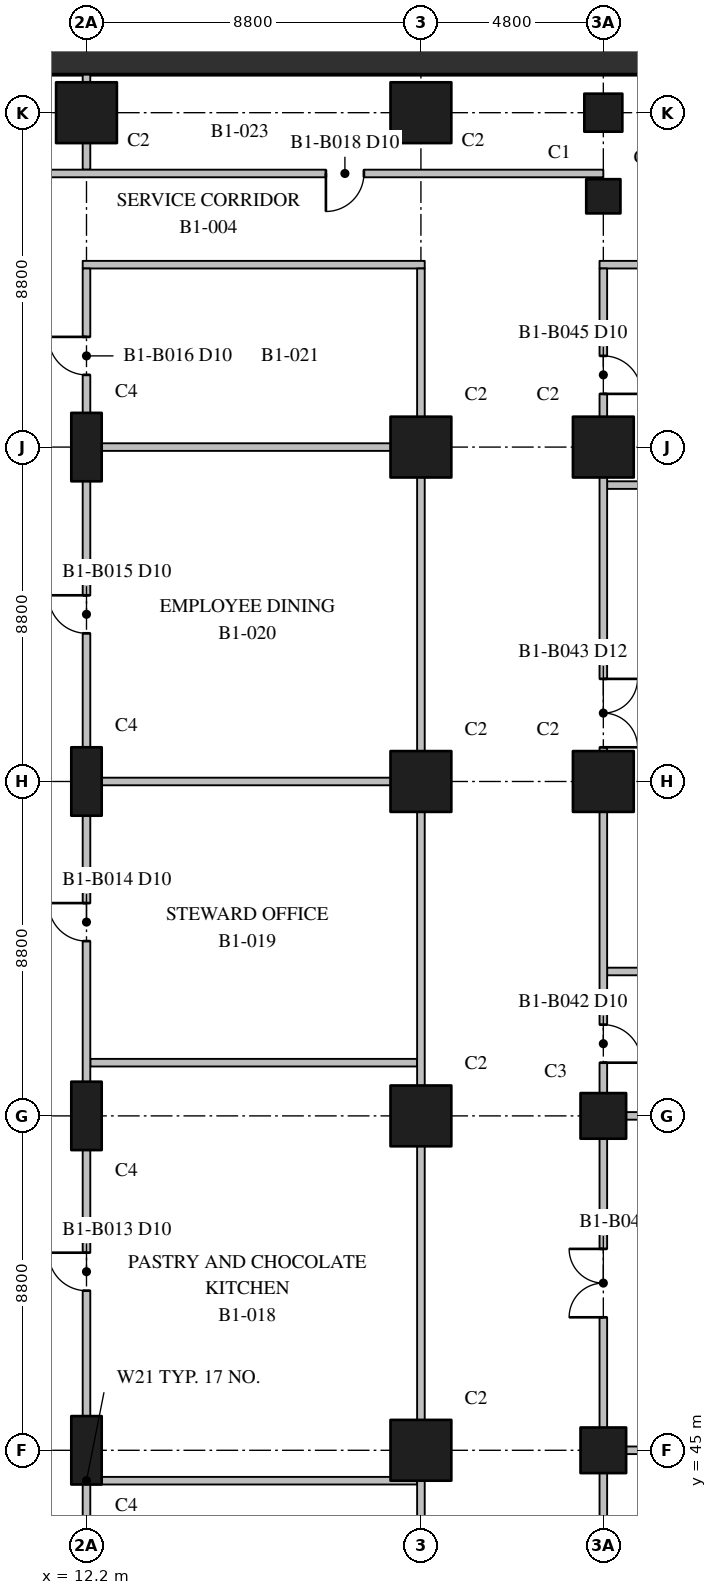
"""IFC4 building model, lengths in metres.
Left out: names, types, materials, properties, quantities, classifications, styles, units other than length and angle.
Written with IfcOpenShell. Run it as: python <this file> out.ifc"""

import sys

from ifc_helpers import new_model, si_unit, direction, frame, frame_2d, origin, origin_2d, place, context, subcontext, project, spatial, rectangle, extrude, element, fill, save


model = new_model("IFC4")
c1 = context("Model", 3, precision=1e-05, world=origin(), true_north=direction((0.0, 1.0)))
c2 = subcontext(c1, "Body", "Model", "MODEL_VIEW")
j1 = project(units=[si_unit("LENGTHUNIT", "METRE"), si_unit("PLANEANGLEUNIT", "RADIAN")], contexts=[c1])
p1 = place(None, origin())
s1 = spatial("IfcSite", under=j1, at=p1, CompositionType="ELEMENT")
p2 = place(p1, origin())
s2 = spatial("IfcBuilding", under=s1, at=p2, CompositionType="ELEMENT")
p3 = place(p2, frame((0.0, 0.0, -7.0)))
s3 = spatial("IfcBuildingStorey", under=s2, at=p3, CompositionType="ELEMENT", Elevation=-7.0)
for number, where, z_axis, x_axis in (
    (1, (12.2, 45.0, 0.0), (0.0, 0.0, 1.0), (0.0, 1.0, 0.0)),
    (2, (12.2, 53.8, 0.0), (0.0, 0.0, 1.0), (0.0, 1.0, 0.0)),
    (3, (12.2, 62.6, 0.0), (0.0, 0.0, 1.0), (0.0, 1.0, 0.0)),
    (4, (12.2, 71.4, 0.0), (0.0, 0.0, 1.0), (0.0, 1.0, 0.0)),
):
    element("IfcColumn", number, at=place(p3, frame(where, z_axis=z_axis, x_axis=x_axis)), inside=s3, PredefinedType="COLUMN", context=c2, shape_type="SweptSolid", body=[
        extrude(rectangle(XDim=1.8, YDim=0.8, at=origin_2d()), origin(), (0.0, 0.0, 1.0), 7.0),
    ])
for number, where, z_axis, x_axis in (
    (5, (12.2, 80.2, 0.0), (0.0, 0.0, 1.0), (1.0, 0.0, 0.0)),
    (6, (21.0, 45.0, 0.0), (0.0, 0.0, 1.0), (1.0, 0.0, 0.0)),
    (7, (21.0, 53.8, 0.0), (0.0, 0.0, 1.0), (1.0, 0.0, 0.0)),
    (8, (21.0, 62.6, 0.0), (0.0, 0.0, 1.0), (1.0, 0.0, 0.0)),
    (9, (21.0, 71.4, 0.0), (0.0, 0.0, 1.0), (1.0, 0.0, 0.0)),
    (10, (21.0, 80.2, 0.0), (0.0, 0.0, 1.0), (1.0, 0.0, 0.0)),
):
    element("IfcColumn", number, at=place(p3, frame(where, z_axis=z_axis, x_axis=x_axis)), inside=s3, PredefinedType="COLUMN", context=c2, shape_type="SweptSolid", body=[
        extrude(rectangle(XDim=1.6, YDim=1.6, at=origin_2d()), origin(), (0.0, 0.0, 1.0), 7.0),
    ])
for number, where, z_axis, x_axis in (
    (11, (25.8, 45.0, 0.0), (0.0, 0.0, 1.0), (1.0, 0.0, 0.0)),
    (12, (25.8, 53.8, 0.0), (0.0, 0.0, 1.0), (1.0, 0.0, 0.0)),
):
    element("IfcColumn", number, at=place(p3, frame(where, z_axis=z_axis, x_axis=x_axis)), inside=s3, PredefinedType="COLUMN", context=c2, shape_type="SweptSolid", body=[
        extrude(rectangle(XDim=1.2, YDim=1.2, at=origin_2d()), origin(), (0.0, 0.0, 1.0), 7.0),
    ])
for number, where, z_axis, x_axis in (
    (13, (25.8, 62.6, 0.0), (0.0, 0.0, 1.0), (1.0, 0.0, 0.0)),
    (14, (25.8, 71.4, 0.0), (0.0, 0.0, 1.0), (1.0, 0.0, 0.0)),
):
    element("IfcColumn", number, at=place(p3, frame(where, z_axis=z_axis, x_axis=x_axis)), inside=s3, PredefinedType="COLUMN", context=c2, shape_type="SweptSolid", body=[
        extrude(rectangle(XDim=1.6, YDim=1.6, at=origin_2d()), origin(), (0.0, 0.0, 1.0), 7.0),
    ])
p4 = place(p3, frame((25.8, 80.2, 0.0), z_axis=(0.0, 0.0, 1.0), x_axis=(1.0, 0.0, 0.0)))
e15 = element("IfcColumn", 15, at=p4, inside=s3, PredefinedType="COLUMN", context=c2, shape_type="SweptSolid", body=[
    extrude(rectangle(XDim=1.0, YDim=1.0, at=origin_2d()), origin(), (0.0, 0.0, 1.0), 7.0),
])
p5 = place(p3, frame((25.8, 78.0, 0.0), z_axis=(0.0, 0.0, 1.0), x_axis=(1.0, 0.0, 0.0)))
e16 = element("IfcColumn", 16, at=p5, inside=s3, PredefinedType="COLUMN", context=c2, shape_type="SweptSolid", body=[
    extrude(rectangle(XDim=0.9, YDim=0.9, at=origin_2d()), origin(), (0.0, 0.0, 1.0), 7.0),
])
p6 = place(p3, frame((1.4, 81.6, 0.0), z_axis=(0.0, 0.0, 1.0), x_axis=(1.0, 0.0, 0.0)))
e17 = element("IfcWall", 17, at=p6, inside=s3, PredefinedType="SHEAR", context=c2, shape_type="SweptSolid", body=[
    extrude(rectangle(XDim=78.0, YDim=0.8, at=frame_2d((39.0, 0.0))), origin(), (0.0, 0.0, 1.0), 7.0),
])
p7 = place(p3, frame((12.1, 76.2, 0.0), z_axis=(0.0, 0.0, 1.0), x_axis=(1.0, 0.0, 0.0)))
e18 = element("IfcWall", 18, at=p7, inside=s3, PredefinedType="PARTITIONING", context=c2, shape_type="SweptSolid", body=[
    extrude(rectangle(XDim=9.0, YDim=0.2, at=frame_2d((4.5, 0.0))), origin(), (0.0, 0.0, 1.0), 6.5),
])
p8 = place(p3, frame((25.7, 76.2, 0.0), z_axis=(0.0, 0.0, 1.0), x_axis=(1.0, 0.0, 0.0)))
e19 = element("IfcWall", 19, at=p8, inside=s3, PredefinedType="PARTITIONING", context=c2, shape_type="SweptSolid", body=[
    extrude(rectangle(XDim=15.4, YDim=0.2, at=frame_2d((7.7, 0.0))), origin(), (0.0, 0.0, 1.0), 6.5),
])
p9 = place(p8, frame((12.7, 0.0, 0.0)))
e20 = element("IfcOpeningElement", 20, at=p9, cuts=e19, PredefinedType="OPENING", context=c2, shape_type="SweptSolid", body=[
    extrude(rectangle(XDim=1.0, YDim=2.1, at=frame_2d((0.5, 1.05))), frame((0.0, 0.11, 0.0), z_axis=(0.0, -1.0, 0.0), x_axis=(1.0, 0.0, 0.0)), (0.0, 0.0, 1.0), 0.22),
])
p10 = place(p3, frame((2.2, 78.6, 0.0), z_axis=(0.0, 0.0, 1.0), x_axis=(1.0, 0.0, 0.0)))
e21 = element("IfcWall", 21, at=p10, inside=s3, PredefinedType="PARTITIONING", context=c2, shape_type="SweptSolid", body=[
    extrude(rectangle(XDim=23.6, YDim=0.2, at=frame_2d((11.8, 0.0))), origin(), (0.0, 0.0, 1.0), 6.5),
])
p11 = place(p10, frame((4.5, 0.0, 0.0)))
e22 = element("IfcOpeningElement", 22, at=p11, cuts=e21, PredefinedType="OPENING", context=c2, shape_type="SweptSolid", body=[
    extrude(rectangle(XDim=1.0, YDim=2.1, at=frame_2d((0.5, 1.05))), frame((0.0, 0.11, 0.0), z_axis=(0.0, -1.0, 0.0), x_axis=(1.0, 0.0, 0.0)), (0.0, 0.0, 1.0), 0.22),
])
p12 = place(p10, frame((16.3, 0.0, 0.0)))
e23 = element("IfcOpeningElement", 23, at=p12, cuts=e21, PredefinedType="OPENING", context=c2, shape_type="SweptSolid", body=[
    extrude(rectangle(XDim=1.0, YDim=2.1, at=frame_2d((0.5, 1.05))), frame((0.0, 0.11, 0.0), z_axis=(0.0, -1.0, 0.0), x_axis=(1.0, 0.0, 0.0)), (0.0, 0.0, 1.0), 0.22),
])
for number, where, z_axis, x_axis in (
    (24, (12.3, 44.2, 0.0), (0.0, 0.0, 1.0), (1.0, 0.0, 0.0)),
    (25, (12.3, 55.2, 0.0), (0.0, 0.0, 1.0), (1.0, 0.0, 0.0)),
    (26, (12.3, 62.6, 0.0), (0.0, 0.0, 1.0), (1.0, 0.0, 0.0)),
    (27, (12.3, 71.4, 0.0), (0.0, 0.0, 1.0), (1.0, 0.0, 0.0)),
):
    element("IfcWall", number, at=place(p3, frame(where, z_axis=z_axis, x_axis=x_axis)), inside=s3, PredefinedType="PARTITIONING", context=c2, shape_type="SweptSolid", body=[
        extrude(rectangle(XDim=8.6, YDim=0.2, at=frame_2d((4.3, 0.0))), origin(), (0.0, 0.0, 1.0), 6.5),
    ])
p13 = place(p3, frame((25.9, 45.0, 0.0), z_axis=(0.0, 0.0, 1.0), x_axis=(1.0, 0.0, 0.0)))
e28 = element("IfcWall", 28, at=p13, inside=s3, PredefinedType="PARTITIONING", context=c2, shape_type="SweptSolid", body=[
    extrude(rectangle(XDim=55.3, YDim=0.2, at=frame_2d((27.65, 0.0))), origin(), (0.0, 0.0, 1.0), 6.5),
])
p14 = place(p13, frame((23.4, 0.0, 0.0)))
e29 = element("IfcOpeningElement", 29, at=p14, cuts=e28, PredefinedType="OPENING", context=c2, shape_type="SweptSolid", body=[
    extrude(rectangle(XDim=1.8, YDim=2.4, at=frame_2d((0.9, 1.2))), frame((0.0, 0.11, 0.0), z_axis=(0.0, -1.0, 0.0), x_axis=(1.0, 0.0, 0.0)), (0.0, 0.0, 1.0), 0.22),
])
p15 = place(p13, frame((31.4, 0.0, 0.0)))
e30 = element("IfcOpeningElement", 30, at=p15, cuts=e28, PredefinedType="OPENING", context=c2, shape_type="SweptSolid", body=[
    extrude(rectangle(XDim=1.8, YDim=2.4, at=frame_2d((0.9, 1.2))), frame((0.0, 0.11, 0.0), z_axis=(0.0, -1.0, 0.0), x_axis=(1.0, 0.0, 0.0)), (0.0, 0.0, 1.0), 0.22),
])
p16 = place(p13, frame((40.2, 0.0, 0.0)))
e31 = element("IfcOpeningElement", 31, at=p16, cuts=e28, PredefinedType="OPENING", context=c2, shape_type="SweptSolid", body=[
    extrude(rectangle(XDim=1.8, YDim=2.4, at=frame_2d((0.9, 1.2))), frame((0.0, 0.11, 0.0), z_axis=(0.0, -1.0, 0.0), x_axis=(1.0, 0.0, 0.0)), (0.0, 0.0, 1.0), 0.22),
])
p17 = place(p13, frame((46.9, 0.0, 0.0)))
e32 = element("IfcOpeningElement", 32, at=p17, cuts=e28, PredefinedType="OPENING", context=c2, shape_type="SweptSolid", body=[
    extrude(rectangle(XDim=1.8, YDim=2.4, at=frame_2d((0.9, 1.2))), frame((0.0, 0.11, 0.0), z_axis=(0.0, -1.0, 0.0), x_axis=(1.0, 0.0, 0.0)), (0.0, 0.0, 1.0), 0.22),
])
p18 = place(p3, frame((25.9, 53.8, 0.0), z_axis=(0.0, 0.0, 1.0), x_axis=(1.0, 0.0, 0.0)))
e33 = element("IfcWall", 33, at=p18, inside=s3, PredefinedType="PARTITIONING", context=c2, shape_type="SweptSolid", body=[
    extrude(rectangle(XDim=20.6, YDim=0.2, at=frame_2d((10.3, 0.0))), origin(), (0.0, 0.0, 1.0), 6.5),
])
p19 = place(p3, frame((25.9, 57.6, 0.0), z_axis=(0.0, 0.0, 1.0), x_axis=(1.0, 0.0, 0.0)))
e34 = element("IfcWall", 34, at=p19, inside=s3, PredefinedType="PARTITIONING", context=c2, shape_type="SweptSolid", body=[
    extrude(rectangle(XDim=11.0, YDim=0.2, at=frame_2d((5.5, 0.0))), origin(), (0.0, 0.0, 1.0), 6.5),
])
p20 = place(p19, frame((4.5, 0.0, 0.0)))
e35 = element("IfcOpeningElement", 35, at=p20, cuts=e34, PredefinedType="OPENING", context=c2, shape_type="SweptSolid", body=[
    extrude(rectangle(XDim=1.8, YDim=2.1, at=frame_2d((0.9, 1.05))), frame((0.0, 0.11, 0.0), z_axis=(0.0, -1.0, 0.0), x_axis=(1.0, 0.0, 0.0)), (0.0, 0.0, 1.0), 0.22),
])
p21 = place(p3, frame((25.9, 70.4, 0.0), z_axis=(0.0, 0.0, 1.0), x_axis=(1.0, 0.0, 0.0)))
e36 = element("IfcWall", 36, at=p21, inside=s3, PredefinedType="PARTITIONING", context=c2, shape_type="SweptSolid", body=[
    extrude(rectangle(XDim=10.8, YDim=0.2, at=frame_2d((5.4, 0.0))), origin(), (0.0, 0.0, 1.0), 6.5),
])
p22 = place(p21, frame((4.5, 0.0, 0.0)))
e37 = element("IfcOpeningElement", 37, at=p22, cuts=e36, PredefinedType="OPENING", context=c2, shape_type="SweptSolid", body=[
    extrude(rectangle(XDim=1.8, YDim=2.1, at=frame_2d((0.9, 1.05))), frame((0.0, 0.11, 0.0), z_axis=(0.0, -1.0, 0.0), x_axis=(1.0, 0.0, 0.0)), (0.0, 0.0, 1.0), 0.22),
])
p23 = place(p3, frame((12.2, 12.3, 0.0), z_axis=(0.0, 0.0, 1.0), x_axis=(0.0, 1.0, 0.0)))
e38 = element("IfcWall", 38, at=p23, inside=s3, PredefinedType="PARTITIONING", context=c2, shape_type="SweptSolid", body=[
    extrude(rectangle(XDim=63.8, YDim=0.2, at=frame_2d((31.9, 0.0))), origin(), (0.0, 0.0, 1.0), 6.5),
])
p24 = place(p23, frame((4.3, 0.0, 0.0)))
e39 = element("IfcOpeningElement", 39, at=p24, cuts=e38, PredefinedType="OPENING", context=c2, shape_type="SweptSolid", body=[
    extrude(rectangle(XDim=1.0, YDim=2.1, at=frame_2d((0.5, 1.05))), frame((0.0, 0.11, 0.0), z_axis=(0.0, -1.0, 0.0), x_axis=(1.0, 0.0, 0.0)), (0.0, 0.0, 1.0), 0.22),
])
p25 = place(p23, frame((11.8, 0.0, 0.0)))
e40 = element("IfcOpeningElement", 40, at=p25, cuts=e38, PredefinedType="OPENING", context=c2, shape_type="SweptSolid", body=[
    extrude(rectangle(XDim=1.0, YDim=2.1, at=frame_2d((0.5, 1.05))), frame((0.0, 0.11, 0.0), z_axis=(0.0, -1.0, 0.0), x_axis=(1.0, 0.0, 0.0)), (0.0, 0.0, 1.0), 0.22),
])
p26 = place(p23, frame((19.5, 0.0, 0.0)))
e41 = element("IfcOpeningElement", 41, at=p26, cuts=e38, PredefinedType="OPENING", context=c2, shape_type="SweptSolid", body=[
    extrude(rectangle(XDim=1.0, YDim=2.1, at=frame_2d((0.5, 1.05))), frame((0.0, 0.11, 0.0), z_axis=(0.0, -1.0, 0.0), x_axis=(1.0, 0.0, 0.0)), (0.0, 0.0, 1.0), 0.22),
])
p27 = place(p23, frame((28.0, 0.0, 0.0)))
e42 = element("IfcOpeningElement", 42, at=p27, cuts=e38, PredefinedType="OPENING", context=c2, shape_type="SweptSolid", body=[
    extrude(rectangle(XDim=1.0, YDim=2.1, at=frame_2d((0.5, 1.05))), frame((0.0, 0.11, 0.0), z_axis=(0.0, -1.0, 0.0), x_axis=(1.0, 0.0, 0.0)), (0.0, 0.0, 1.0), 0.22),
])
p28 = place(p23, frame((36.9, 0.0, 0.0)))
e43 = element("IfcOpeningElement", 43, at=p28, cuts=e38, PredefinedType="OPENING", context=c2, shape_type="SweptSolid", body=[
    extrude(rectangle(XDim=1.0, YDim=2.1, at=frame_2d((0.5, 1.05))), frame((0.0, 0.11, 0.0), z_axis=(0.0, -1.0, 0.0), x_axis=(1.0, 0.0, 0.0)), (0.0, 0.0, 1.0), 0.22),
])
p29 = place(p23, frame((46.1, 0.0, 0.0)))
e44 = element("IfcOpeningElement", 44, at=p29, cuts=e38, PredefinedType="OPENING", context=c2, shape_type="SweptSolid", body=[
    extrude(rectangle(XDim=1.0, YDim=2.1, at=frame_2d((0.5, 1.05))), frame((0.0, 0.11, 0.0), z_axis=(0.0, -1.0, 0.0), x_axis=(1.0, 0.0, 0.0)), (0.0, 0.0, 1.0), 0.22),
])
p30 = place(p23, frame((54.2, 0.0, 0.0)))
e45 = element("IfcOpeningElement", 45, at=p30, cuts=e38, PredefinedType="OPENING", context=c2, shape_type="SweptSolid", body=[
    extrude(rectangle(XDim=1.0, YDim=2.1, at=frame_2d((0.5, 1.05))), frame((0.0, 0.11, 0.0), z_axis=(0.0, -1.0, 0.0), x_axis=(1.0, 0.0, 0.0)), (0.0, 0.0, 1.0), 0.22),
])
p31 = place(p23, frame((61.0, 0.0, 0.0)))
e46 = element("IfcOpeningElement", 46, at=p31, cuts=e38, PredefinedType="OPENING", context=c2, shape_type="SweptSolid", body=[
    extrude(rectangle(XDim=1.0, YDim=2.1, at=frame_2d((0.5, 1.05))), frame((0.0, 0.11, 0.0), z_axis=(0.0, -1.0, 0.0), x_axis=(1.0, 0.0, 0.0)), (0.0, 0.0, 1.0), 0.22),
])
p32 = place(p3, frame((12.2, 78.7, 0.0), z_axis=(0.0, 0.0, 1.0), x_axis=(0.0, 1.0, 0.0)))
e47 = element("IfcWall", 47, at=p32, inside=s3, PredefinedType="PARTITIONING", context=c2, shape_type="SweptSolid", body=[
    extrude(rectangle(XDim=2.5, YDim=0.2, at=frame_2d((1.25, 0.0))), origin(), (0.0, 0.0, 1.0), 6.5),
])
p33 = place(p3, frame((21.0, 12.3, 0.0), z_axis=(0.0, 0.0, 1.0), x_axis=(0.0, 1.0, 0.0)))
e48 = element("IfcWall", 48, at=p33, inside=s3, PredefinedType="PARTITIONING", context=c2, shape_type="SweptSolid", body=[
    extrude(rectangle(XDim=63.8, YDim=0.2, at=frame_2d((31.9, 0.0))), origin(), (0.0, 0.0, 1.0), 6.5),
])
p34 = place(p3, frame((25.8, 12.3, 0.0), z_axis=(0.0, 0.0, 1.0), x_axis=(0.0, 1.0, 0.0)))
e49 = element("IfcWall", 49, at=p34, inside=s3, PredefinedType="PARTITIONING", context=c2, shape_type="SweptSolid", body=[
    extrude(rectangle(XDim=63.8, YDim=0.2, at=frame_2d((31.9, 0.0))), origin(), (0.0, 0.0, 1.0), 6.5),
])
p35 = place(p34, frame((18.3, 0.0, 0.0)))
e50 = element("IfcOpeningElement", 50, at=p35, cuts=e49, PredefinedType="OPENING", context=c2, shape_type="SweptSolid", body=[
    extrude(rectangle(XDim=1.8, YDim=2.1, at=frame_2d((0.9, 1.05))), frame((0.0, 0.11, 0.0), z_axis=(0.0, -1.0, 0.0), x_axis=(1.0, 0.0, 0.0)), (0.0, 0.0, 1.0), 0.22),
])
p36 = place(p34, frame((27.4, 0.0, 0.0)))
e51 = element("IfcOpeningElement", 51, at=p36, cuts=e49, PredefinedType="OPENING", context=c2, shape_type="SweptSolid", body=[
    extrude(rectangle(XDim=1.8, YDim=2.1, at=frame_2d((0.9, 1.05))), frame((0.0, 0.11, 0.0), z_axis=(0.0, -1.0, 0.0), x_axis=(1.0, 0.0, 0.0)), (0.0, 0.0, 1.0), 0.22),
])
p37 = place(p34, frame((36.2, 0.0, 0.0)))
e52 = element("IfcOpeningElement", 52, at=p37, cuts=e49, PredefinedType="OPENING", context=c2, shape_type="SweptSolid", body=[
    extrude(rectangle(XDim=1.8, YDim=2.1, at=frame_2d((0.9, 1.05))), frame((0.0, 0.11, 0.0), z_axis=(0.0, -1.0, 0.0), x_axis=(1.0, 0.0, 0.0)), (0.0, 0.0, 1.0), 0.22),
])
p38 = place(p34, frame((42.9, 0.0, 0.0)))
e53 = element("IfcOpeningElement", 53, at=p38, cuts=e49, PredefinedType="OPENING", context=c2, shape_type="SweptSolid", body=[
    extrude(rectangle(XDim=1.0, YDim=2.1, at=frame_2d((0.5, 1.05))), frame((0.0, 0.11, 0.0), z_axis=(0.0, -1.0, 0.0), x_axis=(1.0, 0.0, 0.0)), (0.0, 0.0, 1.0), 0.22),
])
p39 = place(p34, frame((51.2, 0.0, 0.0)))
e54 = element("IfcOpeningElement", 54, at=p39, cuts=e49, PredefinedType="OPENING", context=c2, shape_type="SweptSolid", body=[
    extrude(rectangle(XDim=1.8, YDim=2.1, at=frame_2d((0.9, 1.05))), frame((0.0, 0.11, 0.0), z_axis=(0.0, -1.0, 0.0), x_axis=(1.0, 0.0, 0.0)), (0.0, 0.0, 1.0), 0.22),
])
p40 = place(p34, frame((60.5, 0.0, 0.0)))
e55 = element("IfcOpeningElement", 55, at=p40, cuts=e49, PredefinedType="OPENING", context=c2, shape_type="SweptSolid", body=[
    extrude(rectangle(XDim=1.0, YDim=2.1, at=frame_2d((0.5, 1.05))), frame((0.0, 0.11, 0.0), z_axis=(0.0, -1.0, 0.0), x_axis=(1.0, 0.0, 0.0)), (0.0, 0.0, 1.0), 0.22),
])
p41 = place(p28, origin())
e56 = element("IfcDoor", 56, at=p41, inside=s3, OperationType="SINGLE_SWING_RIGHT", PredefinedType="DOOR", context=c2, shape_type="SweptSolid", body=[
    extrude(rectangle(XDim=1.0, YDim=2.1, at=frame_2d((0.5, 1.05))), frame((0.0, 0.025, 0.0), z_axis=(0.0, -1.0, 0.0), x_axis=(1.0, 0.0, 0.0)), (0.0, 0.0, 1.0), 0.05),
])
fill(e43, e56)
p42 = place(p29, origin())
e57 = element("IfcDoor", 57, at=p42, inside=s3, OperationType="SINGLE_SWING_RIGHT", PredefinedType="DOOR", context=c2, shape_type="SweptSolid", body=[
    extrude(rectangle(XDim=1.0, YDim=2.1, at=frame_2d((0.5, 1.05))), frame((0.0, 0.025, 0.0), z_axis=(0.0, -1.0, 0.0), x_axis=(1.0, 0.0, 0.0)), (0.0, 0.0, 1.0), 0.05),
])
fill(e44, e57)
p43 = place(p30, origin())
e58 = element("IfcDoor", 58, at=p43, inside=s3, OperationType="SINGLE_SWING_RIGHT", PredefinedType="DOOR", context=c2, shape_type="SweptSolid", body=[
    extrude(rectangle(XDim=1.0, YDim=2.1, at=frame_2d((0.5, 1.05))), frame((0.0, 0.025, 0.0), z_axis=(0.0, -1.0, 0.0), x_axis=(1.0, 0.0, 0.0)), (0.0, 0.0, 1.0), 0.05),
])
fill(e45, e58)
p44 = place(p31, origin())
e59 = element("IfcDoor", 59, at=p44, inside=s3, OperationType="SINGLE_SWING_RIGHT", PredefinedType="DOOR", context=c2, shape_type="SweptSolid", body=[
    extrude(rectangle(XDim=1.0, YDim=2.1, at=frame_2d((0.5, 1.05))), frame((0.0, 0.025, 0.0), z_axis=(0.0, -1.0, 0.0), x_axis=(1.0, 0.0, 0.0)), (0.0, 0.0, 1.0), 0.05),
])
fill(e46, e59)
p45 = place(p12, frame((1.0, 0.0, 0.0), z_axis=(0.0, 0.0, 1.0), x_axis=(-1.0, 0.0, 0.0)))
e60 = element("IfcDoor", 60, at=p45, inside=s3, OperationType="SINGLE_SWING_LEFT", PredefinedType="DOOR", context=c2, shape_type="SweptSolid", body=[
    extrude(rectangle(XDim=1.0, YDim=2.1, at=frame_2d((0.5, 1.05))), frame((0.0, 0.025, 0.0), z_axis=(0.0, -1.0, 0.0), x_axis=(1.0, 0.0, 0.0)), (0.0, 0.0, 1.0), 0.05),
])
fill(e23, e60)
p46 = place(p37, origin())
e61 = element("IfcDoor", 61, at=p46, inside=s3, OperationType="DOUBLE_DOOR_SINGLE_SWING", PredefinedType="DOOR", context=c2, shape_type="SweptSolid", body=[
    extrude(rectangle(XDim=1.8, YDim=2.1, at=frame_2d((0.9, 1.05))), frame((0.0, 0.025, 0.0), z_axis=(0.0, -1.0, 0.0), x_axis=(1.0, 0.0, 0.0)), (0.0, 0.0, 1.0), 0.05),
])
fill(e52, e61)
p47 = place(p38, frame((1.0, 0.0, 0.0), z_axis=(0.0, 0.0, 1.0), x_axis=(-1.0, 0.0, 0.0)))
e62 = element("IfcDoor", 62, at=p47, inside=s3, OperationType="SINGLE_SWING_LEFT", PredefinedType="DOOR", context=c2, shape_type="SweptSolid", body=[
    extrude(rectangle(XDim=1.0, YDim=2.1, at=frame_2d((0.5, 1.05))), frame((0.0, 0.025, 0.0), z_axis=(0.0, -1.0, 0.0), x_axis=(1.0, 0.0, 0.0)), (0.0, 0.0, 1.0), 0.05),
])
fill(e53, e62)
p48 = place(p39, frame((1.8, 0.0, 0.0), z_axis=(0.0, 0.0, 1.0), x_axis=(-1.0, 0.0, 0.0)))
e63 = element("IfcDoor", 63, at=p48, inside=s3, OperationType="DOUBLE_DOOR_SINGLE_SWING", PredefinedType="DOOR", context=c2, shape_type="SweptSolid", body=[
    extrude(rectangle(XDim=1.8, YDim=2.1, at=frame_2d((0.9, 1.05))), frame((0.0, 0.025, 0.0), z_axis=(0.0, -1.0, 0.0), x_axis=(1.0, 0.0, 0.0)), (0.0, 0.0, 1.0), 0.05),
])
fill(e54, e63)
p49 = place(p40, frame((1.0, 0.0, 0.0), z_axis=(0.0, 0.0, 1.0), x_axis=(-1.0, 0.0, 0.0)))
e64 = element("IfcDoor", 64, at=p49, inside=s3, OperationType="SINGLE_SWING_LEFT", PredefinedType="DOOR", context=c2, shape_type="SweptSolid", body=[
    extrude(rectangle(XDim=1.0, YDim=2.1, at=frame_2d((0.5, 1.05))), frame((0.0, 0.025, 0.0), z_axis=(0.0, -1.0, 0.0), x_axis=(1.0, 0.0, 0.0)), (0.0, 0.0, 1.0), 0.05),
])
fill(e55, e64)
save(model, sys.argv[1])
